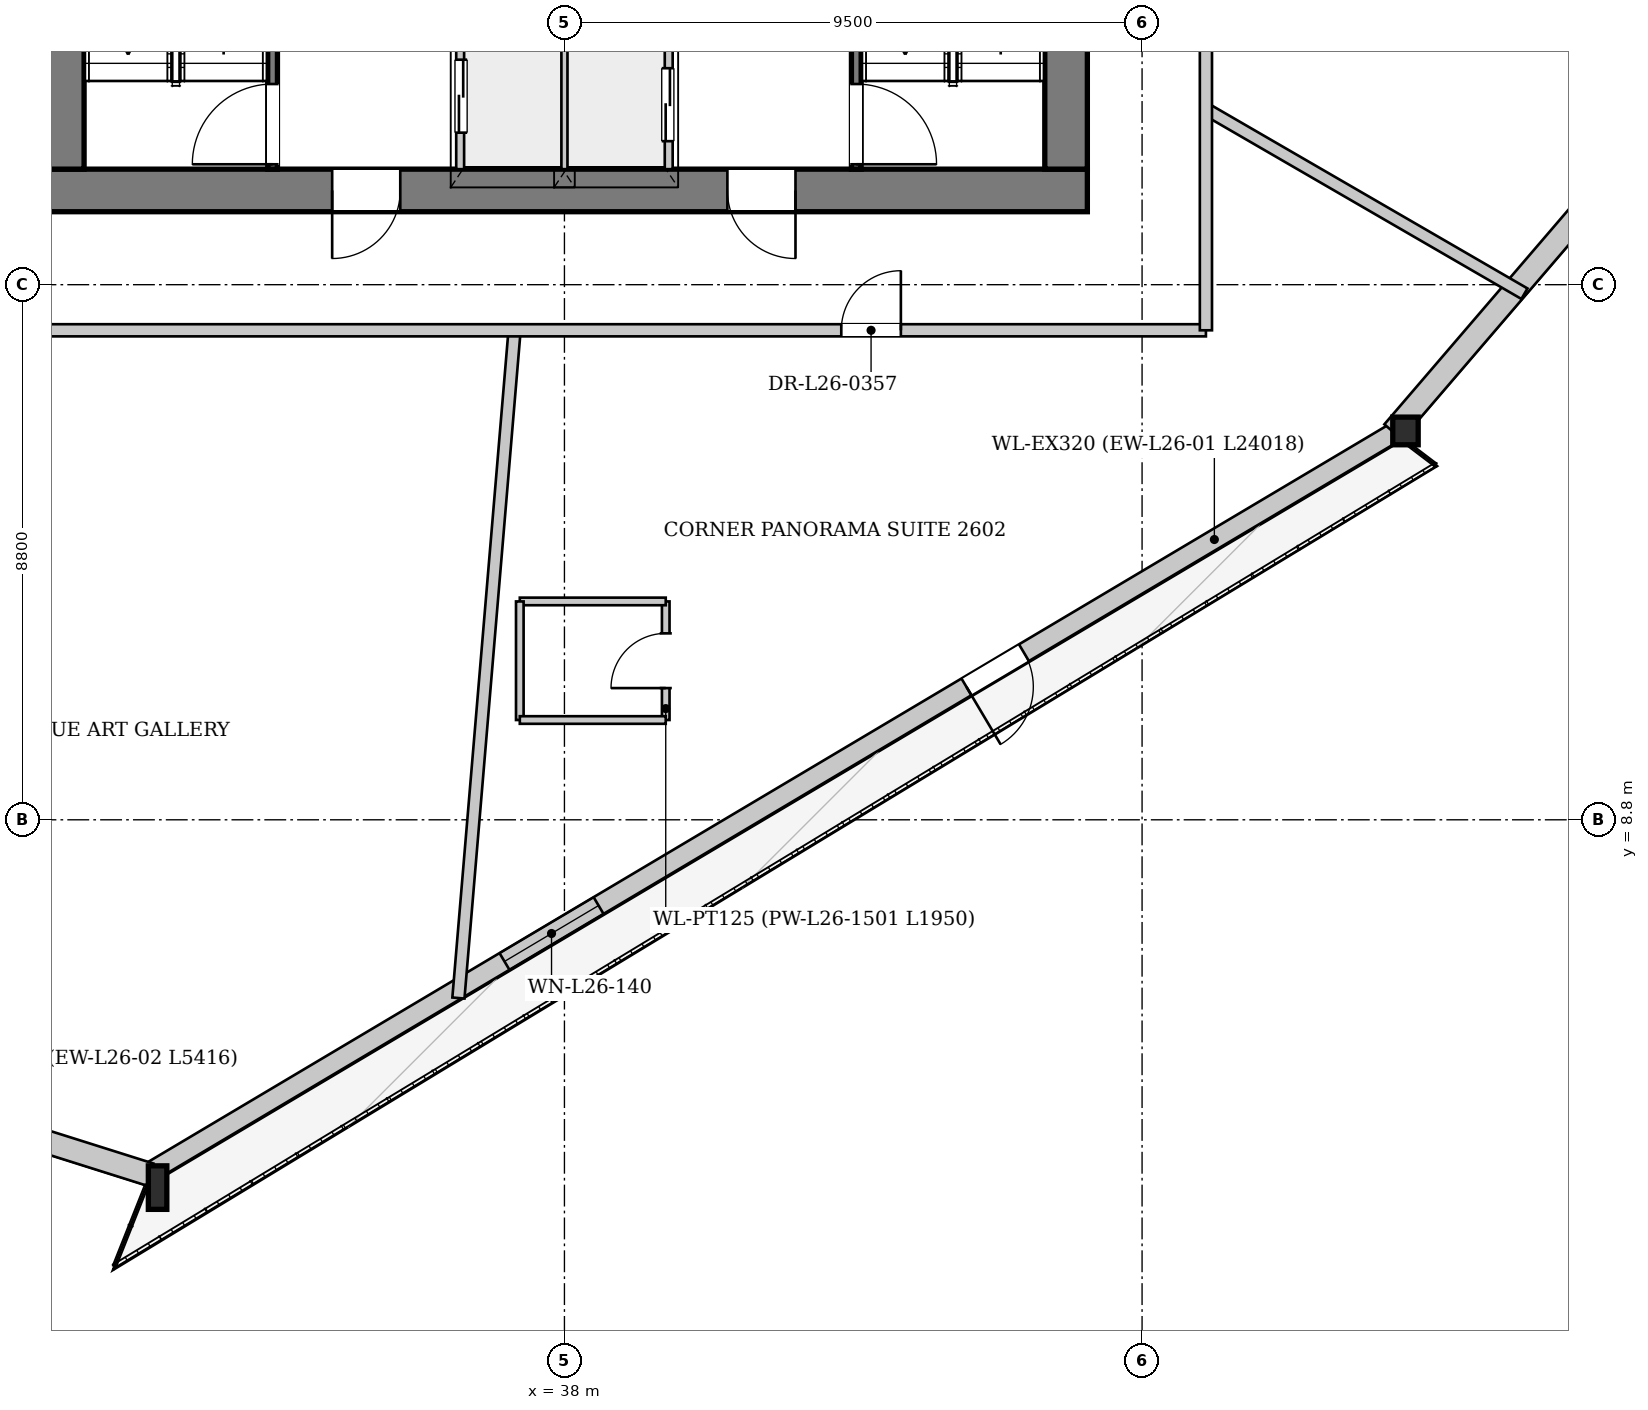
"""IFC4 building model, lengths in metres.
Left out: names, types, materials, properties, quantities, classifications, styles, units other than length and angle.
Written with IfcOpenShell. Run it as: python <this file> out.ifc"""

import sys

from ifc_helpers import new_model, si_unit, direction, frame, frame_2d, origin, origin_2d, place, context, subcontext, project, spatial, rectangle, i_section, extrude, source, transform, mapped, element, fill, save


model = new_model("IFC4")
c1 = context("Model", 3, precision=1e-05, world=origin(), true_north=direction((0.0, 1.0)))
c2 = subcontext(c1, "Body", "Model", "MODEL_VIEW")
j1 = project(units=[si_unit("LENGTHUNIT", "METRE"), si_unit("PLANEANGLEUNIT", "RADIAN")], contexts=[c1])
p1 = place(None, origin())
s1 = spatial("IfcSite", under=j1, at=p1, CompositionType="ELEMENT")
p2 = place(p1, origin())
s2 = spatial("IfcBuilding", under=s1, at=p2, CompositionType="ELEMENT")
p3 = place(p2, frame((0.0, 0.0, 102.15)))
s3 = spatial("IfcBuildingStorey", under=s2, at=p3, CompositionType="ELEMENT", Elevation=102.15)
m1 = source(origin(), c2, "Body", "SweptSolid", [
    extrude(i_section(OverallWidth=0.304, OverallDepth=0.716, WebThickness=0.021, FlangeThickness=0.04, at=origin_2d()), origin(), (0.0, 0.0, 1.0), 3.405),
])
p4 = place(p3, frame((31.126, 2.785, 0.0), z_axis=(0.107183075815, -0.019787644766, 0.994042372021), x_axis=(0.181547479456, 0.983382180387, 0.0)))
e1 = element("IfcColumn", 1, at=p4, inside=s3, PredefinedType="COLUMN", context=c2, shape_type="MappedRepresentation", body=[
    mapped(m1, transform((0.0, 0.0, 0.0), x_axis=(1.0, 0.0, 0.0), y_axis=(0.0, 1.0, 0.0), z_axis=(0.0, 0.0, 1.0), scale=1.0)),
])
m2 = source(origin(), c2, "Body", "SweptSolid", [
    extrude(i_section(OverallWidth=0.418, OverallDepth=0.455, WebThickness=0.038, FlangeThickness=0.059, at=origin_2d()), origin(), (0.0, 0.0, 1.0), 3.398),
])
p5 = place(p3, frame((51.773, 15.056, 0.0), z_axis=(0.034627118192, 0.081538960889, 0.996068451736), x_axis=(-0.920440355662, 0.390883040907, 0.0)))
e2 = element("IfcColumn", 2, at=p5, inside=s3, PredefinedType="COLUMN", context=c2, shape_type="MappedRepresentation", body=[
    mapped(m2, transform((0.0, 0.0, 0.0), x_axis=(1.0, 0.0, 0.0), y_axis=(0.0, 1.0, 0.0), z_axis=(0.0, 0.0, 1.0), scale=1.0)),
])
p6 = place(p3, frame((51.691, 15.194, 0.0), z_axis=(0.0, 0.0, 1.0), x_axis=(-0.859633504472, -0.510911184052, 0.0)))
e3 = element("IfcWall", 3, at=p6, inside=s3, PredefinedType="SOLIDWALL", context=c2, shape_type="SweptSolid", body=[
    extrude(rectangle(XDim=24.018, YDim=0.32, at=frame_2d((12.009, 0.0))), origin(), (0.0, 0.0, 1.0), 2.692),
])
p7 = place(p6, frame((7.136, 0.0, 0.0)))
e4 = element("IfcOpeningElement", 4, at=p7, cuts=e3, PredefinedType="OPENING", context=c2, shape_type="SweptSolid", body=[
    extrude(rectangle(XDim=1.1, YDim=2.3, at=frame_2d((0.55, 1.15))), frame((0.0, 0.17, 0.0), z_axis=(0.0, -1.0, 0.0), x_axis=(1.0, 0.0, 0.0)), (0.0, 0.0, 1.0), 0.34),
])
p8 = place(p6, frame((15.274, 0.0, 0.372)))
e5 = element("IfcOpeningElement", 5, at=p8, cuts=e3, PredefinedType="OPENING", context=c2, shape_type="SweptSolid", body=[
    extrude(rectangle(XDim=1.8, YDim=2.2, at=frame_2d((0.9, 1.1))), frame((0.0, 0.17, 0.0), z_axis=(0.0, -1.0, 0.0), x_axis=(1.0, 0.0, 0.0)), (0.0, 0.0, 1.0), 0.34),
])
p9 = place(p3, frame((31.183, 2.966, 0.0), z_axis=(0.0, 0.0, 1.0), x_axis=(-0.953718137142, 0.300702036718, 0.0)))
e6 = element("IfcWall", 6, at=p9, inside=s3, PredefinedType="SOLIDWALL", context=c2, shape_type="SweptSolid", body=[
    extrude(rectangle(XDim=5.416, YDim=0.38, at=frame_2d((2.708, 0.0))), origin(), (0.0, 0.0, 1.0), 2.692),
])
p10 = place(p3, frame((67.268, 33.409, 0.0), z_axis=(0.0, 0.0, 1.0), x_axis=(-0.651112760172, -0.75898101, 0.0)))
e7 = element("IfcWall", 7, at=p10, inside=s3, PredefinedType="SOLIDWALL", context=c2, shape_type="SweptSolid", body=[
    extrude(rectangle(XDim=24.018, YDim=0.38, at=frame_2d((12.009, 0.0))), origin(), (0.0, 0.0, 1.0), 2.692),
])
p11 = place(p10, frame((5.625, 0.0, 0.322)))
e8 = element("IfcOpeningElement", 8, at=p11, cuts=e7, PredefinedType="OPENING", context=c2, shape_type="SweptSolid", body=[
    extrude(rectangle(XDim=2.2, YDim=2.25, at=frame_2d((1.1, 1.125))), frame((0.0, 0.2, 0.0), z_axis=(0.0, -1.0, 0.0), x_axis=(1.0, 0.0, 0.0)), (0.0, 0.0, 1.0), 0.4),
])
p12 = place(p10, frame((16.193, 0.0, 0.322)))
e9 = element("IfcOpeningElement", 9, at=p12, cuts=e7, PredefinedType="OPENING", context=c2, shape_type="SweptSolid", body=[
    extrude(rectangle(XDim=2.2, YDim=2.25, at=frame_2d((1.1, 1.125))), frame((0.0, 0.2, 0.0), z_axis=(0.0, -1.0, 0.0), x_axis=(1.0, 0.0, 0.0)), (0.0, 0.0, 1.0), 0.4),
])
p13 = place(p3, frame((46.6, 19.15, 0.0), z_axis=(0.0, 0.0, 1.0), x_axis=(-1.0, 0.0, 0.0)))
e10 = element("IfcWall", 10, at=p13, inside=s3, PredefinedType="SHEAR", context=c2, shape_type="SweptSolid", body=[
    extrude(rectangle(XDim=17.2, YDim=0.7, at=frame_2d((8.6, 0.0))), origin(), (0.0, 0.0, 1.0), 3.3),
])
p14 = place(p13, frame((4.8, 0.0, 0.0)))
e11 = element("IfcOpeningElement", 11, at=p14, cuts=e10, PredefinedType="OPENING", context=c2, shape_type="SweptSolid", body=[
    extrude(rectangle(XDim=1.12, YDim=2.25, at=frame_2d((0.56, 1.125))), frame((0.0, 0.36, 0.0), z_axis=(0.0, -1.0, 0.0), x_axis=(1.0, 0.0, 0.0)), (0.0, 0.0, 1.0), 0.72),
])
p15 = place(p13, frame((11.3, 0.0, 0.0)))
e12 = element("IfcOpeningElement", 12, at=p15, cuts=e10, PredefinedType="OPENING", context=c2, shape_type="SweptSolid", body=[
    extrude(rectangle(XDim=1.12, YDim=2.25, at=frame_2d((0.56, 1.125))), frame((0.0, 0.36, 0.0), z_axis=(0.0, -1.0, 0.0), x_axis=(1.0, 0.0, 0.0)), (0.0, 0.0, 1.0), 0.72),
])
p16 = place(p3, frame((29.75, 19.5, 0.0), z_axis=(0.0, 0.0, 1.0), x_axis=(0.0, 1.0, 0.0)))
e13 = element("IfcWall", 13, at=p16, inside=s3, PredefinedType="SHEAR", context=c2, shape_type="SweptSolid", body=[
    extrude(rectangle(XDim=14.2, YDim=0.7, at=frame_2d((7.1, 0.0))), origin(), (0.0, 0.0, 1.0), 3.3),
])
p17 = place(p16, frame((7.42, 0.0, 0.0)))
e14 = element("IfcOpeningElement", 14, at=p17, cuts=e13, PredefinedType="OPENING", context=c2, shape_type="SweptSolid", body=[
    extrude(rectangle(XDim=1.6, YDim=2.2, at=frame_2d((0.8, 1.1))), frame((0.0, 0.36, 0.0), z_axis=(0.0, -1.0, 0.0), x_axis=(1.0, 0.0, 0.0)), (0.0, 0.0, 1.0), 0.72),
])
p18 = place(p3, frame((46.25, 33.7, 0.0), z_axis=(0.0, 0.0, 1.0), x_axis=(0.0, -1.0, 0.0)))
e15 = element("IfcWall", 15, at=p18, inside=s3, PredefinedType="SHEAR", context=c2, shape_type="SweptSolid", body=[
    extrude(rectangle(XDim=14.2, YDim=0.7, at=frame_2d((7.1, 0.0))), origin(), (0.0, 0.0, 1.0), 3.3),
])
p19 = place(p18, frame((5.18, 0.0, 0.0)))
e16 = element("IfcOpeningElement", 16, at=p19, cuts=e15, PredefinedType="OPENING", context=c2, shape_type="SweptSolid", body=[
    extrude(rectangle(XDim=1.6, YDim=2.2, at=frame_2d((0.8, 1.1))), frame((0.0, 0.36, 0.0), z_axis=(0.0, -1.0, 0.0), x_axis=(1.0, 0.0, 0.0)), (0.0, 0.0, 1.0), 0.72),
])
p20 = place(p3, frame((33.2, 19.5, 0.0), z_axis=(0.0, 0.0, 1.0), x_axis=(0.0, 1.0, 0.0)))
e17 = element("IfcWall", 17, at=p20, inside=s3, PredefinedType="PARTITIONING", context=c2, shape_type="SweptSolid", body=[
    extrude(rectangle(XDim=7.46, YDim=0.16, at=frame_2d((3.73, 0.0))), origin(), (0.0, 0.0, 1.0), 3.3),
])
p21 = place(p20, frame((0.08, 0.0, 0.0)))
e18 = element("IfcOpeningElement", 18, at=p21, cuts=e17, PredefinedType="OPENING", context=c2, shape_type="SweptSolid", body=[
    extrude(rectangle(XDim=1.32, YDim=2.2, at=frame_2d((0.66, 1.1))), frame((0.0, 0.09, 0.0), z_axis=(0.0, -1.0, 0.0), x_axis=(1.0, 0.0, 0.0)), (0.0, 0.0, 1.0), 0.18),
])
p22 = place(p3, frame((42.8, 26.96, 0.0), z_axis=(0.0, 0.0, 1.0), x_axis=(0.0, -1.0, 0.0)))
e19 = element("IfcWall", 19, at=p22, inside=s3, PredefinedType="PARTITIONING", context=c2, shape_type="SweptSolid", body=[
    extrude(rectangle(XDim=7.46, YDim=0.16, at=frame_2d((3.73, 0.0))), origin(), (0.0, 0.0, 1.0), 3.3),
])
p23 = place(p22, frame((6.06, 0.0, 0.0)))
e20 = element("IfcOpeningElement", 20, at=p23, cuts=e19, PredefinedType="OPENING", context=c2, shape_type="SweptSolid", body=[
    extrude(rectangle(XDim=1.32, YDim=2.2, at=frame_2d((0.66, 1.1))), frame((0.0, 0.09, 0.0), z_axis=(0.0, -1.0, 0.0), x_axis=(1.0, 0.0, 0.0)), (0.0, 0.0, 1.0), 0.18),
])
p24 = place(p3, frame((36.3, 19.5, 0.0), z_axis=(0.0, 0.0, 1.0), x_axis=(0.0, 1.0, 0.0)))
e21 = element("IfcWall", 21, at=p24, inside=s3, PredefinedType="PARTITIONING", context=c2, shape_type="SweptSolid", body=[
    extrude(rectangle(XDim=4.78, YDim=0.16, at=frame_2d((2.39, 0.0))), origin(), (0.0, 0.0, 1.0), 3.3),
])
p25 = place(p24, frame((0.6, 0.0, 0.0)))
e22 = element("IfcOpeningElement", 22, at=p25, cuts=e21, PredefinedType="OPENING", context=c2, shape_type="SweptSolid", body=[
    extrude(rectangle(XDim=1.2, YDim=2.2, at=frame_2d((0.6, 1.1))), frame((0.0, 0.09, 0.0), z_axis=(0.0, -1.0, 0.0), x_axis=(1.0, 0.0, 0.0)), (0.0, 0.0, 1.0), 0.18),
])
p26 = place(p24, frame((2.65, 0.0, 0.0)))
e23 = element("IfcOpeningElement", 23, at=p26, cuts=e21, PredefinedType="OPENING", context=c2, shape_type="SweptSolid", body=[
    extrude(rectangle(XDim=0.95, YDim=2.1, at=frame_2d((0.475, 1.05))), frame((0.0, 0.09, 0.0), z_axis=(0.0, -1.0, 0.0), x_axis=(1.0, 0.0, 0.0)), (0.0, 0.0, 1.0), 0.18),
])
p27 = place(p3, frame((39.7, 24.28, 0.0), z_axis=(0.0, 0.0, 1.0), x_axis=(0.0, -1.0, 0.0)))
e24 = element("IfcWall", 24, at=p27, inside=s3, PredefinedType="PARTITIONING", context=c2, shape_type="SweptSolid", body=[
    extrude(rectangle(XDim=4.78, YDim=0.16, at=frame_2d((2.39, 0.0))), origin(), (0.0, 0.0, 1.0), 3.3),
])
p28 = place(p27, frame((3.12, 0.0, 0.0)))
e25 = element("IfcOpeningElement", 25, at=p28, cuts=e24, PredefinedType="OPENING", context=c2, shape_type="SweptSolid", body=[
    extrude(rectangle(XDim=1.2, YDim=2.2, at=frame_2d((0.6, 1.1))), frame((0.0, 0.09, 0.0), z_axis=(0.0, -1.0, 0.0), x_axis=(1.0, 0.0, 0.0)), (0.0, 0.0, 1.0), 0.18),
])
p29 = place(p3, frame((38.0, 19.5, 0.0), z_axis=(0.0, 0.0, 1.0), x_axis=(0.0, 1.0, 0.0)))
e26 = element("IfcWall", 26, at=p29, inside=s3, PredefinedType="PARTITIONING", context=c2, shape_type="SweptSolid", body=[
    extrude(rectangle(XDim=2.46, YDim=0.125, at=frame_2d((1.23, 0.0))), origin(), (0.0, 0.0, 1.0), 3.3),
])
p30 = place(p3, frame((37.18, 16.85, 0.0), z_axis=(0.0, 0.0, 1.0), x_axis=(-0.083810010625, -0.996481752025, 0.0)))
e27 = element("IfcWall", 27, at=p30, inside=s3, PredefinedType="PARTITIONING", context=c2, shape_type="SweptSolid", body=[
    extrude(rectangle(XDim=11.02, YDim=0.2, at=frame_2d((5.51, 0.0))), origin(), (0.0, 0.0, 1.0), 3.3),
])
p31 = place(p3, frame((48.55, 20.487, 0.0), z_axis=(0.0, 0.0, 1.0), x_axis=(0.865269800029, -0.501306466304, 0.0)))
e28 = element("IfcWall", 28, at=p31, inside=s3, PredefinedType="PARTITIONING", context=c2, shape_type="SweptSolid", body=[
    extrude(rectangle(XDim=6.054, YDim=0.2, at=frame_2d((3.027, 0.0))), origin(), (0.0, 0.0, 1.0), 3.3),
])
p32 = place(p3, frame((39.666, 10.441, 0.0), z_axis=(0.0, 0.0, 1.0), x_axis=(0.0, 1.0, 0.0)))
e29 = element("IfcWall", 29, at=p32, inside=s3, PredefinedType="PARTITIONING", context=c2, shape_type="SweptSolid", body=[
    extrude(rectangle(XDim=1.95, YDim=0.125, at=frame_2d((0.975, 0.0))), origin(), (0.0, 0.0, 1.0), 3.3),
])
p33 = place(p32, frame((0.525, 0.0, 0.0)))
e30 = element("IfcOpeningElement", 30, at=p33, cuts=e29, PredefinedType="OPENING", context=c2, shape_type="SweptSolid", body=[
    extrude(rectangle(XDim=0.9, YDim=2.1, at=frame_2d((0.45, 1.05))), frame((0.0, 0.073, 0.0), z_axis=(0.0, -1.0, 0.0), x_axis=(1.0, 0.0, 0.0)), (0.0, 0.0, 1.0), 0.145),
])
p34 = place(p3, frame((39.666, 12.391, 0.0), z_axis=(0.0, 0.0, 1.0), x_axis=(-1.0, 0.0, 0.0)))
e31 = element("IfcWall", 31, at=p34, inside=s3, PredefinedType="PARTITIONING", context=c2, shape_type="SweptSolid", body=[
    extrude(rectangle(XDim=2.4, YDim=0.125, at=frame_2d((1.2, 0.0))), origin(), (0.0, 0.0, 1.0), 2.985),
])
p35 = place(p3, frame((37.266, 12.391, 0.0), z_axis=(0.0, 0.0, 1.0), x_axis=(0.0, -1.0, 0.0)))
e32 = element("IfcWall", 32, at=p35, inside=s3, PredefinedType="PARTITIONING", context=c2, shape_type="SweptSolid", body=[
    extrude(rectangle(XDim=1.95, YDim=0.125, at=frame_2d((0.975, 0.0))), origin(), (0.0, 0.0, 1.0), 3.3),
])
p36 = place(p3, frame((37.266, 10.441, 0.0), z_axis=(0.0, 0.0, 1.0), x_axis=(1.0, 0.0, 0.0)))
e33 = element("IfcWall", 33, at=p36, inside=s3, PredefinedType="PARTITIONING", context=c2, shape_type="SweptSolid", body=[
    extrude(rectangle(XDim=2.4, YDim=0.125, at=frame_2d((1.2, 0.0))), origin(), (0.0, 0.0, 1.0), 3.3),
])
p37 = place(p3, frame((27.45, 16.85, 0.0), z_axis=(0.0, 0.0, 1.0), x_axis=(1.0, 0.0, 0.0)))
e34 = element("IfcWall", 34, at=p37, inside=s3, PredefinedType="PARTITIONING", context=c2, shape_type="SweptSolid", body=[
    extrude(rectangle(XDim=21.1, YDim=0.2, at=frame_2d((10.55, 0.0))), origin(), (0.0, 0.0, 1.0), 3.3),
])
p38 = place(p37, frame((0.3, 0.0, 0.0)))
e35 = element("IfcOpeningElement", 35, at=p38, cuts=e34, PredefinedType="OPENING", context=c2, shape_type="SweptSolid", body=[
    extrude(rectangle(XDim=0.98, YDim=2.15, at=frame_2d((0.49, 1.075))), frame((0.0, 0.11, 0.0), z_axis=(0.0, -1.0, 0.0), x_axis=(1.0, 0.0, 0.0)), (0.0, 0.0, 1.0), 0.22),
])
p39 = place(p37, frame((15.103, 0.0, 0.0)))
e36 = element("IfcOpeningElement", 36, at=p39, cuts=e34, PredefinedType="OPENING", context=c2, shape_type="SweptSolid", body=[
    extrude(rectangle(XDim=0.98, YDim=2.15, at=frame_2d((0.49, 1.075))), frame((0.0, 0.11, 0.0), z_axis=(0.0, -1.0, 0.0), x_axis=(1.0, 0.0, 0.0)), (0.0, 0.0, 1.0), 0.22),
])
p40 = place(p3, frame((48.55, 16.85, 0.0), z_axis=(0.0, 0.0, 1.0), x_axis=(0.0, 1.0, 0.0)))
e37 = element("IfcWall", 37, at=p40, inside=s3, PredefinedType="PARTITIONING", context=c2, shape_type="SweptSolid", body=[
    extrude(rectangle(XDim=19.5, YDim=0.2, at=frame_2d((9.75, 0.0))), origin(), (0.0, 0.0, 1.0), 3.3),
])
p41 = place(p40, frame((7.951, 0.0, 0.0)))
e38 = element("IfcOpeningElement", 38, at=p41, cuts=e37, PredefinedType="OPENING", context=c2, shape_type="SweptSolid", body=[
    extrude(rectangle(XDim=0.98, YDim=2.15, at=frame_2d((0.49, 1.075))), frame((0.0, 0.11, 0.0), z_axis=(0.0, -1.0, 0.0), x_axis=(1.0, 0.0, 0.0)), (0.0, 0.0, 1.0), 0.22),
])
m3 = source(origin(), c2, "Body", "SweptSolid", [
    extrude(rectangle(XDim=1.1, YDim=2.3, at=frame_2d((0.55, 1.15))), frame((0.0, 0.025, 0.0), z_axis=(0.0, -1.0, 0.0), x_axis=(1.0, 0.0, 0.0)), (0.0, 0.0, 1.0), 0.05),
])
p42 = place(p7, origin())
e39 = element("IfcDoor", 39, at=p42, inside=s3, OperationType="SINGLE_SWING_RIGHT", PredefinedType="DOOR", context=c2, shape_type="MappedRepresentation", body=[
    mapped(m3, transform((0.0, 0.0, 0.0), x_axis=(1.0, 0.0, 0.0), y_axis=(0.0, 1.0, 0.0), z_axis=(0.0, 0.0, 1.0), scale=1.0)),
])
fill(e4, e39)
m4 = source(origin(), c2, "Body", "SweptSolid", [
    extrude(rectangle(XDim=1.8, YDim=2.2, at=frame_2d((0.9, 1.1))), frame((0.0, 0.03, 0.0), z_axis=(0.0, -1.0, 0.0), x_axis=(1.0, 0.0, 0.0)), (0.0, 0.0, 1.0), 0.06),
])
p43 = place(p8, origin())
e40 = element("IfcWindow", 40, at=p43, inside=s3, PartitioningType="SINGLE_PANEL", PredefinedType="WINDOW", context=c2, shape_type="MappedRepresentation", body=[
    mapped(m4, transform((0.0, 0.0, 0.0), x_axis=(1.0, 0.0, 0.0), y_axis=(0.0, 1.0, 0.0), z_axis=(0.0, 0.0, 1.0), scale=1.0)),
])
fill(e5, e40)
m5 = source(origin(), c2, "Body", "SweptSolid", [
    extrude(rectangle(XDim=1.12, YDim=2.25, at=frame_2d((0.56, 1.125))), frame((0.0, 0.025, 0.0), z_axis=(0.0, -1.0, 0.0), x_axis=(1.0, 0.0, 0.0)), (0.0, 0.0, 1.0), 0.05),
])
p44 = place(p14, origin())
e41 = element("IfcDoor", 41, at=p44, inside=s3, OperationType="SINGLE_SWING_LEFT", PredefinedType="DOOR", context=c2, shape_type="MappedRepresentation", body=[
    mapped(m5, transform((0.0, 0.0, 0.0), x_axis=(1.0, 0.0, 0.0), y_axis=(0.0, 1.0, 0.0), z_axis=(0.0, 0.0, 1.0), scale=1.0)),
])
fill(e11, e41)
p45 = place(p15, origin())
e42 = element("IfcDoor", 42, at=p45, inside=s3, OperationType="SINGLE_SWING_RIGHT", PredefinedType="DOOR", context=c2, shape_type="MappedRepresentation", body=[
    mapped(m5, transform((0.0, 0.0, 0.0), x_axis=(1.0, 0.0, 0.0), y_axis=(0.0, 1.0, 0.0), z_axis=(0.0, 0.0, 1.0), scale=1.0)),
])
fill(e12, e42)
m6 = source(origin(), c2, "Body", "SweptSolid", [
    extrude(rectangle(XDim=1.32, YDim=2.2, at=frame_2d((0.66, 1.1))), frame((0.0, 0.025, 0.0), z_axis=(0.0, -1.0, 0.0), x_axis=(1.0, 0.0, 0.0)), (0.0, 0.0, 1.0), 0.05),
])
p46 = place(p21, origin())
e43 = element("IfcDoor", 43, at=p46, inside=s3, OperationType="SINGLE_SWING_LEFT", PredefinedType="DOOR", context=c2, shape_type="MappedRepresentation", body=[
    mapped(m6, transform((0.0, 0.0, 0.0), x_axis=(1.0, 0.0, 0.0), y_axis=(0.0, 1.0, 0.0), z_axis=(0.0, 0.0, 1.0), scale=1.0)),
])
fill(e18, e43)
p47 = place(p23, origin())
e44 = element("IfcDoor", 44, at=p47, inside=s3, OperationType="SINGLE_SWING_RIGHT", PredefinedType="DOOR", context=c2, shape_type="MappedRepresentation", body=[
    mapped(m6, transform((0.0, 0.0, 0.0), x_axis=(1.0, 0.0, 0.0), y_axis=(0.0, 1.0, 0.0), z_axis=(0.0, 0.0, 1.0), scale=1.0)),
])
fill(e20, e44)
m7 = source(origin(), c2, "Body", "SweptSolid", [
    extrude(rectangle(XDim=1.2, YDim=2.2, at=frame_2d((0.6, 1.1))), frame((0.0, 0.025, 0.0), z_axis=(0.0, -1.0, 0.0), x_axis=(1.0, 0.0, 0.0)), (0.0, 0.0, 1.0), 0.05),
])
p48 = place(p25, origin())
e45 = element("IfcDoor", 45, at=p48, inside=s3, OperationType="DOUBLE_DOOR_SLIDING", PredefinedType="DOOR", context=c2, shape_type="MappedRepresentation", body=[
    mapped(m7, transform((0.0, 0.0, 0.0), x_axis=(1.0, 0.0, 0.0), y_axis=(0.0, 1.0, 0.0), z_axis=(0.0, 0.0, 1.0), scale=1.0)),
])
fill(e22, e45)
p49 = place(p28, origin())
e46 = element("IfcDoor", 46, at=p49, inside=s3, OperationType="DOUBLE_DOOR_SLIDING", PredefinedType="DOOR", context=c2, shape_type="MappedRepresentation", body=[
    mapped(m7, transform((0.0, 0.0, 0.0), x_axis=(1.0, 0.0, 0.0), y_axis=(0.0, 1.0, 0.0), z_axis=(0.0, 0.0, 1.0), scale=1.0)),
])
fill(e25, e46)
m8 = source(origin(), c2, "Body", "SweptSolid", [
    extrude(rectangle(XDim=0.9, YDim=2.1, at=frame_2d((0.45, 1.05))), frame((0.0, 0.025, 0.0), z_axis=(0.0, -1.0, 0.0), x_axis=(1.0, 0.0, 0.0)), (0.0, 0.0, 1.0), 0.05),
])
p50 = place(p33, origin())
e47 = element("IfcDoor", 47, at=p50, inside=s3, OperationType="SINGLE_SWING_LEFT", PredefinedType="DOOR", context=c2, shape_type="MappedRepresentation", body=[
    mapped(m8, transform((0.0, 0.0, 0.0), x_axis=(1.0, 0.0, 0.0), y_axis=(0.0, 1.0, 0.0), z_axis=(0.0, 0.0, 1.0), scale=1.0)),
])
fill(e30, e47)
m9 = source(origin(), c2, "Body", "SweptSolid", [
    extrude(rectangle(XDim=0.98, YDim=2.15, at=frame_2d((0.49, 1.075))), frame((0.0, 0.025, 0.0), z_axis=(0.0, -1.0, 0.0), x_axis=(1.0, 0.0, 0.0)), (0.0, 0.0, 1.0), 0.05),
])
p51 = place(p39, origin())
e48 = element("IfcDoor", 48, at=p51, inside=s3, OperationType="SINGLE_SWING_RIGHT", PredefinedType="DOOR", context=c2, shape_type="MappedRepresentation", body=[
    mapped(m9, transform((0.0, 0.0, 0.0), x_axis=(1.0, 0.0, 0.0), y_axis=(0.0, 1.0, 0.0), z_axis=(0.0, 0.0, 1.0), scale=1.0)),
])
fill(e36, e48)
save(model, sys.argv[1])
